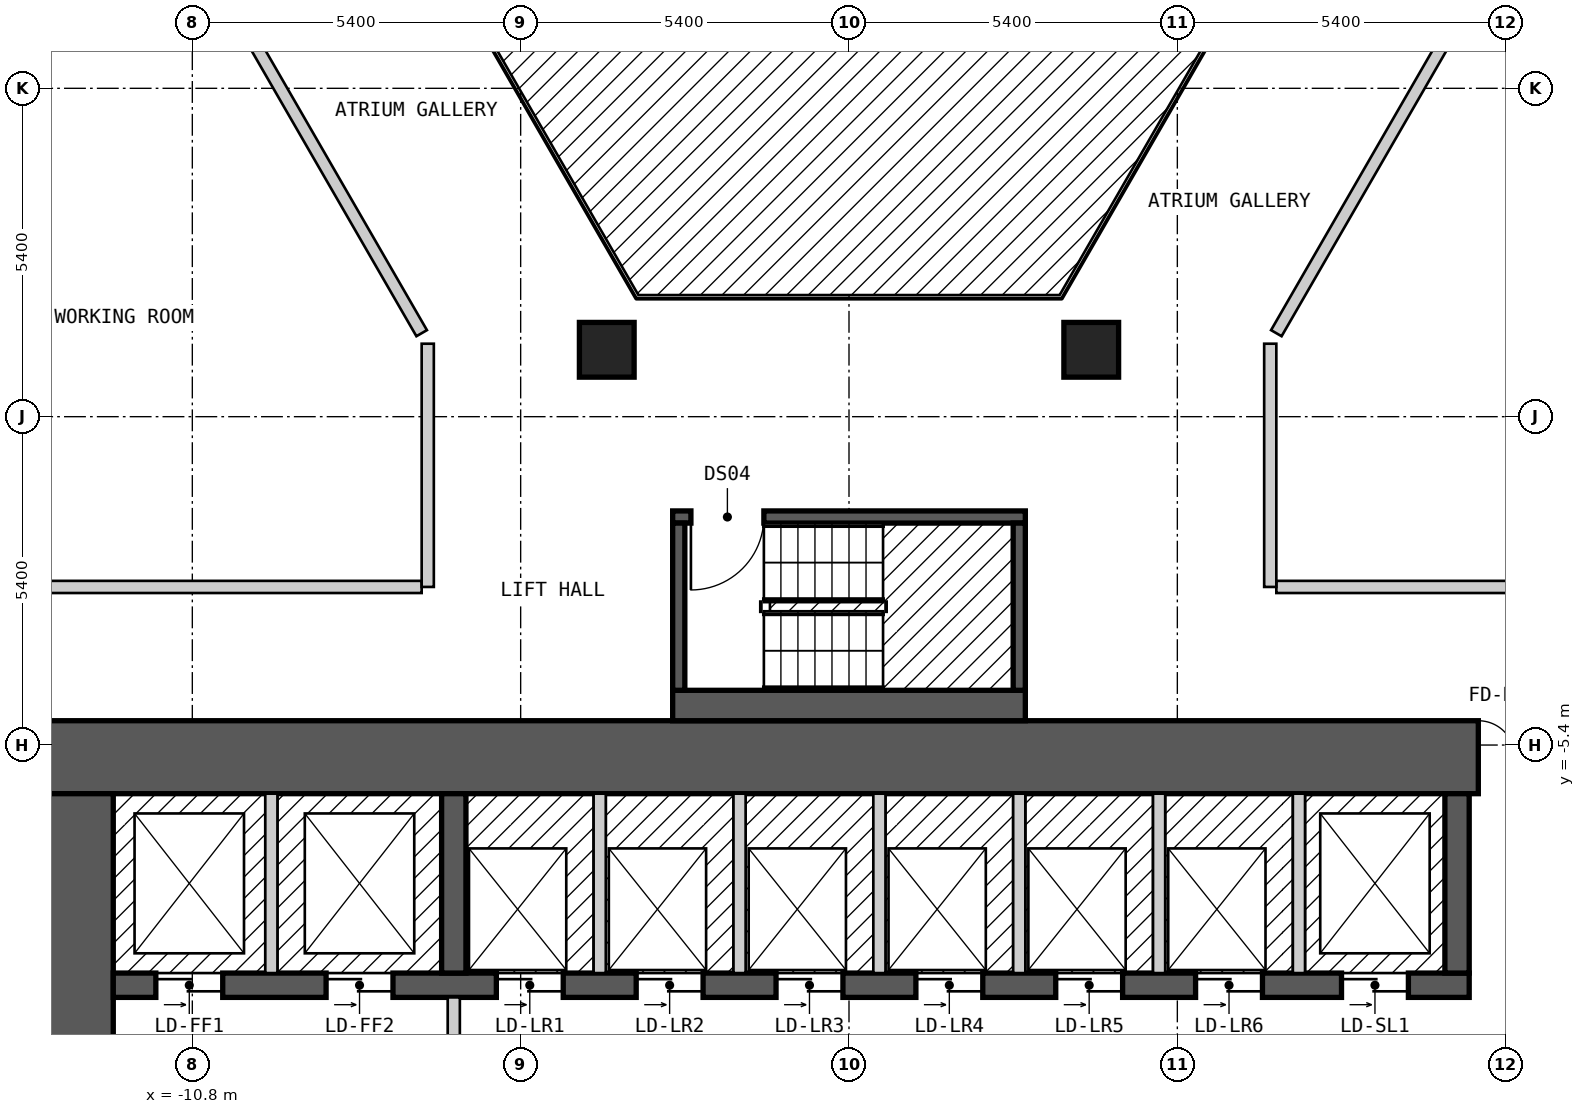
"""IFC4 building model, lengths in metres.
Left out: names, types, materials, properties, quantities, classifications, styles, units other than length and angle.
Written with IfcOpenShell. Run it as: python <this file> out.ifc"""

import sys

from ifc_helpers import new_model, si_unit, direction, frame, frame_2d, origin, origin_2d, place, context, subcontext, project, spatial, rectangle, extrude, element, fill, save


model = new_model("IFC4")
c1 = context("Model", 3, precision=1e-05, world=origin(), true_north=direction((0.0, 1.0)))
c2 = subcontext(c1, "Body", "Model", "MODEL_VIEW")
j1 = project(units=[si_unit("LENGTHUNIT", "METRE"), si_unit("PLANEANGLEUNIT", "RADIAN")], contexts=[c1])
p1 = place(None, origin())
s1 = spatial("IfcSite", under=j1, at=p1, CompositionType="ELEMENT")
p2 = place(p1, origin())
s2 = spatial("IfcBuilding", under=s1, at=p2, CompositionType="ELEMENT")
p3 = place(p2, frame((0.0, 0.0, 26.4)))
s3 = spatial("IfcBuildingStorey", under=s2, at=p3, CompositionType="ELEMENT", Elevation=26.4)
for number, where, z_axis, x_axis in (
    (1, (3.984, 1.1, 0.0), (0.0, 0.0, 1.0), (1.0, 0.0, 0.0)),
    (2, (-3.984, 1.1, 0.0), (0.0, 0.0, 1.0), (1.0, 0.0, 0.0)),
):
    element("IfcColumn", number, at=place(p3, frame(where, z_axis=z_axis, x_axis=x_axis)), inside=s3, PredefinedType="COLUMN", context=c2, shape_type="SweptSolid", body=[
        extrude(rectangle(XDim=0.9, YDim=0.9, at=origin_2d()), origin(), (0.0, 0.0, 1.0), 3.0),
    ])
p4 = place(p3, frame((-13.3, -5.6, 0.0), z_axis=(0.0, 0.0, 1.0), x_axis=(1.0, 0.0, 0.0)))
e3 = element("IfcWall", 3, at=p4, inside=s3, PredefinedType="SHEAR", context=c2, shape_type="SweptSolid", body=[
    extrude(rectangle(XDim=26.6, YDim=1.2, at=frame_2d((13.3, 0.0))), origin(), (0.0, 0.0, 1.0), 2.7),
])
p5 = place(p4, frame((23.65, 0.0, 0.0)))
e4 = element("IfcOpeningElement", 4, at=p5, cuts=e3, PredefinedType="OPENING", context=c2, shape_type="SweptSolid", body=[
    extrude(rectangle(XDim=1.2, YDim=2.1, at=frame_2d((0.6, 1.05))), frame((0.0, 0.61, 0.0), z_axis=(0.0, -1.0, 0.0), x_axis=(1.0, 0.0, 0.0)), (0.0, 0.0, 1.0), 1.22),
])
p6 = place(p3, frame((-12.7, -17.8, 0.0), z_axis=(0.0, 0.0, 1.0), x_axis=(0.0, 1.0, 0.0)))
e5 = element("IfcWall", 5, at=p6, inside=s3, PredefinedType="SHEAR", context=c2, shape_type="SweptSolid", body=[
    extrude(rectangle(XDim=11.6, YDim=1.2, at=frame_2d((5.8, 0.0))), origin(), (0.0, 0.0, 1.0), 2.7),
])
p7 = place(p6, frame((3.6, 0.0, 0.0)))
e6 = element("IfcOpeningElement", 6, at=p7, cuts=e5, PredefinedType="OPENING", context=c2, shape_type="SweptSolid", body=[
    extrude(rectangle(XDim=1.2, YDim=2.1, at=frame_2d((0.6, 1.05))), frame((0.0, 0.61, 0.0), z_axis=(0.0, -1.0, 0.0), x_axis=(1.0, 0.0, 0.0)), (0.0, 0.0, 1.0), 1.22),
])
p8 = place(p3, frame((-12.1, -9.35, 0.0), z_axis=(0.0, 0.0, 1.0), x_axis=(1.0, 0.0, 0.0)))
e7 = element("IfcWall", 7, at=p8, inside=s3, PredefinedType="SHEAR", context=c2, shape_type="SweptSolid", body=[
    extrude(rectangle(XDim=22.3, YDim=0.4, at=frame_2d((11.15, 0.0))), origin(), (0.0, 0.0, 1.0), 2.7),
])
p9 = place(p8, frame((0.7, 0.0, 0.0)))
e8 = element("IfcOpeningElement", 8, at=p9, cuts=e7, PredefinedType="OPENING", context=c2, shape_type="SweptSolid", body=[
    extrude(rectangle(XDim=1.1, YDim=2.1, at=frame_2d((0.55, 1.05))), frame((0.0, 0.21, 0.0), z_axis=(0.0, -1.0, 0.0), x_axis=(1.0, 0.0, 0.0)), (0.0, 0.0, 1.0), 0.42),
])
p10 = place(p8, frame((3.5, 0.0, 0.0)))
e9 = element("IfcOpeningElement", 9, at=p10, cuts=e7, PredefinedType="OPENING", context=c2, shape_type="SweptSolid", body=[
    extrude(rectangle(XDim=1.1, YDim=2.1, at=frame_2d((0.55, 1.05))), frame((0.0, 0.21, 0.0), z_axis=(0.0, -1.0, 0.0), x_axis=(1.0, 0.0, 0.0)), (0.0, 0.0, 1.0), 0.42),
])
p11 = place(p8, frame((6.3, 0.0, 0.0)))
e10 = element("IfcOpeningElement", 10, at=p11, cuts=e7, PredefinedType="OPENING", context=c2, shape_type="SweptSolid", body=[
    extrude(rectangle(XDim=1.1, YDim=2.1, at=frame_2d((0.55, 1.05))), frame((0.0, 0.21, 0.0), z_axis=(0.0, -1.0, 0.0), x_axis=(1.0, 0.0, 0.0)), (0.0, 0.0, 1.0), 0.42),
])
p12 = place(p8, frame((8.6, 0.0, 0.0)))
e11 = element("IfcOpeningElement", 11, at=p12, cuts=e7, PredefinedType="OPENING", context=c2, shape_type="SweptSolid", body=[
    extrude(rectangle(XDim=1.1, YDim=2.1, at=frame_2d((0.55, 1.05))), frame((0.0, 0.21, 0.0), z_axis=(0.0, -1.0, 0.0), x_axis=(1.0, 0.0, 0.0)), (0.0, 0.0, 1.0), 0.42),
])
p13 = place(p8, frame((10.9, 0.0, 0.0)))
e12 = element("IfcOpeningElement", 12, at=p13, cuts=e7, PredefinedType="OPENING", context=c2, shape_type="SweptSolid", body=[
    extrude(rectangle(XDim=1.1, YDim=2.1, at=frame_2d((0.55, 1.05))), frame((0.0, 0.21, 0.0), z_axis=(0.0, -1.0, 0.0), x_axis=(1.0, 0.0, 0.0)), (0.0, 0.0, 1.0), 0.42),
])
p14 = place(p8, frame((13.2, 0.0, 0.0)))
e13 = element("IfcOpeningElement", 13, at=p14, cuts=e7, PredefinedType="OPENING", context=c2, shape_type="SweptSolid", body=[
    extrude(rectangle(XDim=1.1, YDim=2.1, at=frame_2d((0.55, 1.05))), frame((0.0, 0.21, 0.0), z_axis=(0.0, -1.0, 0.0), x_axis=(1.0, 0.0, 0.0)), (0.0, 0.0, 1.0), 0.42),
])
p15 = place(p8, frame((15.5, 0.0, 0.0)))
e14 = element("IfcOpeningElement", 14, at=p15, cuts=e7, PredefinedType="OPENING", context=c2, shape_type="SweptSolid", body=[
    extrude(rectangle(XDim=1.1, YDim=2.1, at=frame_2d((0.55, 1.05))), frame((0.0, 0.21, 0.0), z_axis=(0.0, -1.0, 0.0), x_axis=(1.0, 0.0, 0.0)), (0.0, 0.0, 1.0), 0.42),
])
p16 = place(p8, frame((17.8, 0.0, 0.0)))
e15 = element("IfcOpeningElement", 15, at=p16, cuts=e7, PredefinedType="OPENING", context=c2, shape_type="SweptSolid", body=[
    extrude(rectangle(XDim=1.1, YDim=2.1, at=frame_2d((0.55, 1.05))), frame((0.0, 0.21, 0.0), z_axis=(0.0, -1.0, 0.0), x_axis=(1.0, 0.0, 0.0)), (0.0, 0.0, 1.0), 0.42),
])
p17 = place(p8, frame((20.2, 0.0, 0.0)))
e16 = element("IfcOpeningElement", 16, at=p17, cuts=e7, PredefinedType="OPENING", context=c2, shape_type="SweptSolid", body=[
    extrude(rectangle(XDim=1.1, YDim=2.1, at=frame_2d((0.55, 1.05))), frame((0.0, 0.21, 0.0), z_axis=(0.0, -1.0, 0.0), x_axis=(1.0, 0.0, 0.0)), (0.0, 0.0, 1.0), 0.42),
])
for number, where, z_axis, x_axis in (
    (17, (-6.5, -9.15, 0.0), (0.0, 0.0, 1.0), (0.0, 1.0, 0.0)),
    (18, (10.0, -9.15, 0.0), (0.0, 0.0, 1.0), (0.0, 1.0, 0.0)),
):
    element("IfcWall", number, at=place(p3, frame(where, z_axis=z_axis, x_axis=x_axis)), inside=s3, PredefinedType="SHEAR", context=c2, shape_type="SweptSolid", body=[
        extrude(rectangle(XDim=2.95, YDim=0.4, at=frame_2d((1.475, 0.0))), origin(), (0.0, 0.0, 1.0), 2.7),
    ])
p18 = place(p3, frame((-2.9, -4.75, 0.0), z_axis=(0.0, 0.0, 1.0), x_axis=(1.0, 0.0, 0.0)))
e19 = element("IfcWall", 19, at=p18, inside=s3, PredefinedType="SOLIDWALL", context=c2, shape_type="SweptSolid", body=[
    extrude(rectangle(XDim=5.8, YDim=0.5, at=frame_2d((2.9, 0.0))), origin(), (0.0, 0.0, 1.0), 2.7),
])
p19 = place(p3, frame((-2.9, -1.65, 0.0), z_axis=(0.0, 0.0, 1.0), x_axis=(1.0, 0.0, 0.0)))
e20 = element("IfcWall", 20, at=p19, inside=s3, PredefinedType="SOLIDWALL", context=c2, shape_type="SweptSolid", body=[
    extrude(rectangle(XDim=5.8, YDim=0.2, at=frame_2d((2.9, 0.0))), origin(), (0.0, 0.0, 1.0), 2.7),
])
p20 = place(p19, frame((0.3, 0.0, 0.0)))
e21 = element("IfcOpeningElement", 21, at=p20, cuts=e20, PredefinedType="OPENING", context=c2, shape_type="SweptSolid", body=[
    extrude(rectangle(XDim=1.2, YDim=2.1, at=frame_2d((0.6, 1.05))), frame((0.0, 0.11, 0.0), z_axis=(0.0, -1.0, 0.0), x_axis=(1.0, 0.0, 0.0)), (0.0, 0.0, 1.0), 0.22),
])
for number, where, z_axis, x_axis in (
    (22, (-2.8, -4.5, 0.0), (0.0, 0.0, 1.0), (0.0, 1.0, 0.0)),
    (23, (2.8, -4.5, 0.0), (0.0, 0.0, 1.0), (0.0, 1.0, 0.0)),
):
    element("IfcWall", number, at=place(p3, frame(where, z_axis=z_axis, x_axis=x_axis)), inside=s3, PredefinedType="SOLIDWALL", context=c2, shape_type="SweptSolid", body=[
        extrude(rectangle(XDim=2.75, YDim=0.2, at=frame_2d((1.375, 0.0))), origin(), (0.0, 0.0, 1.0), 2.7),
    ])
p21 = place(p3, frame((-10.796, 7.9, 0.0), z_axis=(0.0, 0.0, 1.0), x_axis=(0.499954271211, -0.866051803703, 0.0)))
e24 = element("IfcWall", 24, at=p21, inside=s3, PredefinedType="PARTITIONING", context=c2, shape_type="SweptSolid", body=[
    extrude(rectangle(XDim=7.536, YDim=0.2, at=frame_2d((3.768, 0.0))), origin(), (0.0, 0.0, 1.0), 2.7),
])
p22 = place(p3, frame((9.18, 15.7, 0.0), z_axis=(0.0, 0.0, 1.0), x_axis=(0.500003652032, -0.866023295272, 0.0)))
e25 = element("IfcWall", 25, at=p22, inside=s3, PredefinedType="PARTITIONING", context=c2, shape_type="SweptSolid", body=[
    extrude(rectangle(XDim=18.012, YDim=0.2, at=frame_2d((9.006, 0.0))), origin(), (0.0, 0.0, 1.0), 2.7),
])
p23 = place(p22, frame((8.556, 0.0, 0.0)))
e26 = element("IfcOpeningElement", 26, at=p23, cuts=e25, PredefinedType="OPENING", context=c2, shape_type="SweptSolid", body=[
    extrude(rectangle(XDim=0.9, YDim=2.1, at=frame_2d((0.45, 1.05))), frame((0.0, 0.11, 0.0), z_axis=(0.0, -1.0, 0.0), x_axis=(1.0, 0.0, 0.0)), (0.0, 0.0, 1.0), 0.22),
])
p24 = place(p3, frame((10.45, 17.9, 0.0), z_axis=(0.0, 0.0, 1.0), x_axis=(0.500034352617, -0.866005569383, 0.0)))
e27 = element("IfcWall", 27, at=p24, inside=s3, PredefinedType="PARTITIONING", context=c2, shape_type="SweptSolid", body=[
    extrude(rectangle(XDim=20.553, YDim=0.2, at=frame_2d((10.276, 0.0))), origin(), (0.0, 0.0, 1.0), 2.7),
])
p25 = place(p24, frame((9.775, 0.0, 0.0)))
e28 = element("IfcOpeningElement", 28, at=p25, cuts=e27, PredefinedType="OPENING", context=c2, shape_type="SweptSolid", body=[
    extrude(rectangle(XDim=1.0, YDim=2.1, at=frame_2d((0.5, 1.05))), frame((0.0, 0.11, 0.0), z_axis=(0.0, -1.0, 0.0), x_axis=(1.0, 0.0, 0.0)), (0.0, 0.0, 1.0), 0.22),
])
p26 = place(p24, frame((0.852, 0.0, 0.0)))
e29 = element("IfcOpeningElement", 29, at=p26, cuts=e27, PredefinedType="OPENING", context=c2, shape_type="SweptSolid", body=[
    extrude(rectangle(XDim=0.8, YDim=2.1, at=frame_2d((0.4, 1.05))), frame((0.0, 0.11, 0.0), z_axis=(0.0, -1.0, 0.0), x_axis=(1.0, 0.0, 0.0)), (0.0, 0.0, 1.0), 0.22),
])
for number, where, z_axis, x_axis in (
    (30, (-15.4, -2.8, 0.0), (0.0, 0.0, 1.0), (1.0, 0.0, 0.0)),
    (31, (7.028, -2.8, 0.0), (0.0, 0.0, 1.0), (1.0, 0.0, 0.0)),
):
    element("IfcWall", number, at=place(p3, frame(where, z_axis=z_axis, x_axis=x_axis)), inside=s3, PredefinedType="PARTITIONING", context=c2, shape_type="SweptSolid", body=[
        extrude(rectangle(XDim=8.372, YDim=0.2, at=frame_2d((4.186, 0.0))), origin(), (0.0, 0.0, 1.0), 2.7),
    ])
p27 = place(p3, frame((7.028, 1.373, 0.0), z_axis=(0.0, 0.0, 1.0), x_axis=(0.49998574534, 0.86603363356, 0.0)))
e32 = element("IfcWall", 32, at=p27, inside=s3, PredefinedType="PARTITIONING", context=c2, shape_type="SweptSolid", body=[
    extrude(rectangle(XDim=7.652, YDim=0.2, at=frame_2d((3.826, 0.0))), origin(), (0.0, 0.0, 1.0), 2.7),
])
p28 = place(p3, frame((-18.244, -0.001, 0.0), z_axis=(0.0, 0.0, 1.0), x_axis=(0.499962999376, 0.866046765051, 0.0)))
e33 = element("IfcWall", 33, at=p28, inside=s3, PredefinedType="PARTITIONING", context=c2, shape_type="SweptSolid", body=[
    extrude(rectangle(XDim=18.245, YDim=0.2, at=frame_2d((9.123, 0.0))), origin(), (0.0, 0.0, 1.0), 2.7),
])
p29 = place(p28, frame((8.672, 0.0, 0.0)))
e34 = element("IfcOpeningElement", 34, at=p29, cuts=e33, PredefinedType="OPENING", context=c2, shape_type="SweptSolid", body=[
    extrude(rectangle(XDim=0.9, YDim=2.1, at=frame_2d((0.45, 1.05))), frame((0.0, 0.11, 0.0), z_axis=(0.0, -1.0, 0.0), x_axis=(1.0, 0.0, 0.0)), (0.0, 0.0, 1.0), 0.22),
])
p30 = place(p3, frame((-20.727, 0.099, 0.0), z_axis=(0.0, 0.0, 1.0), x_axis=(0.499993204491, 0.866029327138, 0.0)))
e35 = element("IfcWall", 35, at=p30, inside=s3, PredefinedType="PARTITIONING", context=c2, shape_type="SweptSolid", body=[
    extrude(rectangle(XDim=20.554, YDim=0.2, at=frame_2d((10.277, 0.0))), origin(), (0.0, 0.0, 1.0), 2.7),
])
p31 = place(p30, frame((18.916, 0.0, 0.0)))
e36 = element("IfcOpeningElement", 36, at=p31, cuts=e35, PredefinedType="OPENING", context=c2, shape_type="SweptSolid", body=[
    extrude(rectangle(XDim=0.8, YDim=2.1, at=frame_2d((0.4, 1.05))), frame((0.0, 0.11, 0.0), z_axis=(0.0, -1.0, 0.0), x_axis=(1.0, 0.0, 0.0)), (0.0, 0.0, 1.0), 0.22),
])
p32 = place(p30, frame((14.88, 0.0, 0.0)))
e37 = element("IfcOpeningElement", 37, at=p32, cuts=e35, PredefinedType="OPENING", context=c2, shape_type="SweptSolid", body=[
    extrude(rectangle(XDim=1.0, YDim=2.1, at=frame_2d((0.5, 1.05))), frame((0.0, 0.11, 0.0), z_axis=(0.0, -1.0, 0.0), x_axis=(1.0, 0.0, 0.0)), (0.0, 0.0, 1.0), 0.22),
])
p33 = place(p30, frame((9.776, 0.0, 0.0)))
e38 = element("IfcOpeningElement", 38, at=p33, cuts=e35, PredefinedType="OPENING", context=c2, shape_type="SweptSolid", body=[
    extrude(rectangle(XDim=1.0, YDim=2.1, at=frame_2d((0.5, 1.05))), frame((0.0, 0.11, 0.0), z_axis=(0.0, -1.0, 0.0), x_axis=(1.0, 0.0, 0.0)), (0.0, 0.0, 1.0), 0.22),
])
p34 = place(p30, frame((4.673, 0.0, 0.0)))
e39 = element("IfcOpeningElement", 39, at=p34, cuts=e35, PredefinedType="OPENING", context=c2, shape_type="SweptSolid", body=[
    extrude(rectangle(XDim=1.0, YDim=2.1, at=frame_2d((0.5, 1.05))), frame((0.0, 0.11, 0.0), z_axis=(0.0, -1.0, 0.0), x_axis=(1.0, 0.0, 0.0)), (0.0, 0.0, 1.0), 0.22),
])
p35 = place(p30, frame((0.838, 0.0, 0.0)))
e40 = element("IfcOpeningElement", 40, at=p35, cuts=e35, PredefinedType="OPENING", context=c2, shape_type="SweptSolid", body=[
    extrude(rectangle(XDim=0.8, YDim=2.1, at=frame_2d((0.4, 1.05))), frame((0.0, 0.11, 0.0), z_axis=(0.0, -1.0, 0.0), x_axis=(1.0, 0.0, 0.0)), (0.0, 0.0, 1.0), 0.22),
])
for number, where, z_axis, x_axis in (
    (41, (6.928, -2.8, 0.0), (0.0, 0.0, 1.0), (0.0, 1.0, 0.0)),
    (42, (-6.928, -2.8, 0.0), (0.0, 0.0, 1.0), (0.0, 1.0, 0.0)),
):
    element("IfcWall", number, at=place(p3, frame(where, z_axis=z_axis, x_axis=x_axis)), inside=s3, PredefinedType="PARTITIONING", context=c2, shape_type="SweptSolid", body=[
        extrude(rectangle(XDim=4.0, YDim=0.2, at=frame_2d((2.0, 0.0))), origin(), (0.0, 0.0, 1.0), 2.7),
    ])
p36 = place(p3, frame((-9.5, -9.15, 0.0), z_axis=(0.0, 0.0, 1.0), x_axis=(0.0, 1.0, 0.0)))
e43 = element("IfcWall", 43, at=p36, inside=s3, PredefinedType="SOLIDWALL", context=c2, shape_type="SweptSolid", body=[
    extrude(rectangle(XDim=2.95, YDim=0.2, at=frame_2d((1.475, 0.0))), origin(), (0.0, 0.0, 1.0), 2.7),
])
p37 = place(p3, frame((-6.5, -14.45, 0.0), z_axis=(0.0, 0.0, 1.0), x_axis=(0.0, 1.0, 0.0)))
e44 = element("IfcWall", 44, at=p37, inside=s3, PredefinedType="PARTITIONING", context=c2, shape_type="SweptSolid", body=[
    extrude(rectangle(XDim=4.9, YDim=0.2, at=frame_2d((2.45, 0.0))), origin(), (0.0, 0.0, 1.0), 2.7),
])
p38 = place(p37, frame((3.15, 0.0, 0.0), z_axis=(0.0, 0.0, 1.0), x_axis=(-1.0, 0.0, 0.0)))
e45 = element("IfcOpeningElement", 45, at=p38, cuts=e44, PredefinedType="OPENING", context=c2, shape_type="SweptSolid", body=[
    extrude(rectangle(XDim=1.4, YDim=2.1, at=frame_2d((0.7, 1.05))), frame((0.0, 0.11, 0.0), z_axis=(0.0, -1.0, 0.0), x_axis=(1.0, 0.0, 0.0)), (0.0, 0.0, 1.0), 0.22),
])
for number, where, z_axis, x_axis in (
    (46, (-4.1, -9.15, 0.0), (0.0, 0.0, 1.0), (0.0, 1.0, 0.0)),
    (47, (-1.8, -9.15, 0.0), (0.0, 0.0, 1.0), (0.0, 1.0, 0.0)),
    (48, (0.5, -9.15, 0.0), (0.0, 0.0, 1.0), (0.0, 1.0, 0.0)),
    (49, (2.8, -9.15, 0.0), (0.0, 0.0, 1.0), (0.0, 1.0, 0.0)),
    (50, (5.1, -9.15, 0.0), (0.0, 0.0, 1.0), (0.0, 1.0, 0.0)),
    (51, (7.4, -9.15, 0.0), (0.0, 0.0, 1.0), (0.0, 1.0, 0.0)),
):
    element("IfcWall", number, at=place(p3, frame(where, z_axis=z_axis, x_axis=x_axis)), inside=s3, PredefinedType="SOLIDWALL", context=c2, shape_type="SweptSolid", body=[
        extrude(rectangle(XDim=2.95, YDim=0.2, at=frame_2d((1.475, 0.0))), origin(), (0.0, 0.0, 1.0), 2.7),
    ])
p39 = place(p20, origin())
e52 = element("IfcDoor", 52, at=p39, inside=s3, OperationType="SINGLE_SWING_LEFT", PredefinedType="DOOR", context=c2, shape_type="SweptSolid", body=[
    extrude(rectangle(XDim=1.2, YDim=2.1, at=frame_2d((0.6, 1.05))), frame((0.0, 0.025, 0.0), z_axis=(0.0, -1.0, 0.0), x_axis=(1.0, 0.0, 0.0)), (0.0, 0.0, 1.0), 0.05),
])
fill(e21, e52)
p40 = place(p9, origin())
e53 = element("IfcDoor", 53, at=p40, inside=s3, OperationType="DOUBLE_DOOR_SLIDING", PredefinedType="DOOR", context=c2, shape_type="SweptSolid", body=[
    extrude(rectangle(XDim=1.1, YDim=2.1, at=frame_2d((0.55, 1.05))), frame((0.0, 0.025, 0.0), z_axis=(0.0, -1.0, 0.0), x_axis=(1.0, 0.0, 0.0)), (0.0, 0.0, 1.0), 0.05),
])
fill(e8, e53)
p41 = place(p10, origin())
e54 = element("IfcDoor", 54, at=p41, inside=s3, OperationType="DOUBLE_DOOR_SLIDING", PredefinedType="DOOR", context=c2, shape_type="SweptSolid", body=[
    extrude(rectangle(XDim=1.1, YDim=2.1, at=frame_2d((0.55, 1.05))), frame((0.0, 0.025, 0.0), z_axis=(0.0, -1.0, 0.0), x_axis=(1.0, 0.0, 0.0)), (0.0, 0.0, 1.0), 0.05),
])
fill(e9, e54)
p42 = place(p11, origin())
e55 = element("IfcDoor", 55, at=p42, inside=s3, OperationType="DOUBLE_DOOR_SLIDING", PredefinedType="DOOR", context=c2, shape_type="SweptSolid", body=[
    extrude(rectangle(XDim=1.1, YDim=2.1, at=frame_2d((0.55, 1.05))), frame((0.0, 0.025, 0.0), z_axis=(0.0, -1.0, 0.0), x_axis=(1.0, 0.0, 0.0)), (0.0, 0.0, 1.0), 0.05),
])
fill(e10, e55)
p43 = place(p12, origin())
e56 = element("IfcDoor", 56, at=p43, inside=s3, OperationType="DOUBLE_DOOR_SLIDING", PredefinedType="DOOR", context=c2, shape_type="SweptSolid", body=[
    extrude(rectangle(XDim=1.1, YDim=2.1, at=frame_2d((0.55, 1.05))), frame((0.0, 0.025, 0.0), z_axis=(0.0, -1.0, 0.0), x_axis=(1.0, 0.0, 0.0)), (0.0, 0.0, 1.0), 0.05),
])
fill(e11, e56)
p44 = place(p13, origin())
e57 = element("IfcDoor", 57, at=p44, inside=s3, OperationType="DOUBLE_DOOR_SLIDING", PredefinedType="DOOR", context=c2, shape_type="SweptSolid", body=[
    extrude(rectangle(XDim=1.1, YDim=2.1, at=frame_2d((0.55, 1.05))), frame((0.0, 0.025, 0.0), z_axis=(0.0, -1.0, 0.0), x_axis=(1.0, 0.0, 0.0)), (0.0, 0.0, 1.0), 0.05),
])
fill(e12, e57)
p45 = place(p14, origin())
e58 = element("IfcDoor", 58, at=p45, inside=s3, OperationType="DOUBLE_DOOR_SLIDING", PredefinedType="DOOR", context=c2, shape_type="SweptSolid", body=[
    extrude(rectangle(XDim=1.1, YDim=2.1, at=frame_2d((0.55, 1.05))), frame((0.0, 0.025, 0.0), z_axis=(0.0, -1.0, 0.0), x_axis=(1.0, 0.0, 0.0)), (0.0, 0.0, 1.0), 0.05),
])
fill(e13, e58)
p46 = place(p15, origin())
e59 = element("IfcDoor", 59, at=p46, inside=s3, OperationType="DOUBLE_DOOR_SLIDING", PredefinedType="DOOR", context=c2, shape_type="SweptSolid", body=[
    extrude(rectangle(XDim=1.1, YDim=2.1, at=frame_2d((0.55, 1.05))), frame((0.0, 0.025, 0.0), z_axis=(0.0, -1.0, 0.0), x_axis=(1.0, 0.0, 0.0)), (0.0, 0.0, 1.0), 0.05),
])
fill(e14, e59)
p47 = place(p16, origin())
e60 = element("IfcDoor", 60, at=p47, inside=s3, OperationType="DOUBLE_DOOR_SLIDING", PredefinedType="DOOR", context=c2, shape_type="SweptSolid", body=[
    extrude(rectangle(XDim=1.1, YDim=2.1, at=frame_2d((0.55, 1.05))), frame((0.0, 0.025, 0.0), z_axis=(0.0, -1.0, 0.0), x_axis=(1.0, 0.0, 0.0)), (0.0, 0.0, 1.0), 0.05),
])
fill(e15, e60)
p48 = place(p17, origin())
e61 = element("IfcDoor", 61, at=p48, inside=s3, OperationType="DOUBLE_DOOR_SLIDING", PredefinedType="DOOR", context=c2, shape_type="SweptSolid", body=[
    extrude(rectangle(XDim=1.1, YDim=2.1, at=frame_2d((0.55, 1.05))), frame((0.0, 0.025, 0.0), z_axis=(0.0, -1.0, 0.0), x_axis=(1.0, 0.0, 0.0)), (0.0, 0.0, 1.0), 0.05),
])
fill(e16, e61)
p49 = place(p5, origin())
e62 = element("IfcDoor", 62, at=p49, inside=s3, OperationType="DOUBLE_DOOR_SINGLE_SWING", PredefinedType="DOOR", context=c2, shape_type="SweptSolid", body=[
    extrude(rectangle(XDim=1.2, YDim=2.1, at=frame_2d((0.6, 1.05))), frame((0.0, 0.025, 0.0), z_axis=(0.0, -1.0, 0.0), x_axis=(1.0, 0.0, 0.0)), (0.0, 0.0, 1.0), 0.05),
])
fill(e4, e62)
save(model, sys.argv[1])
